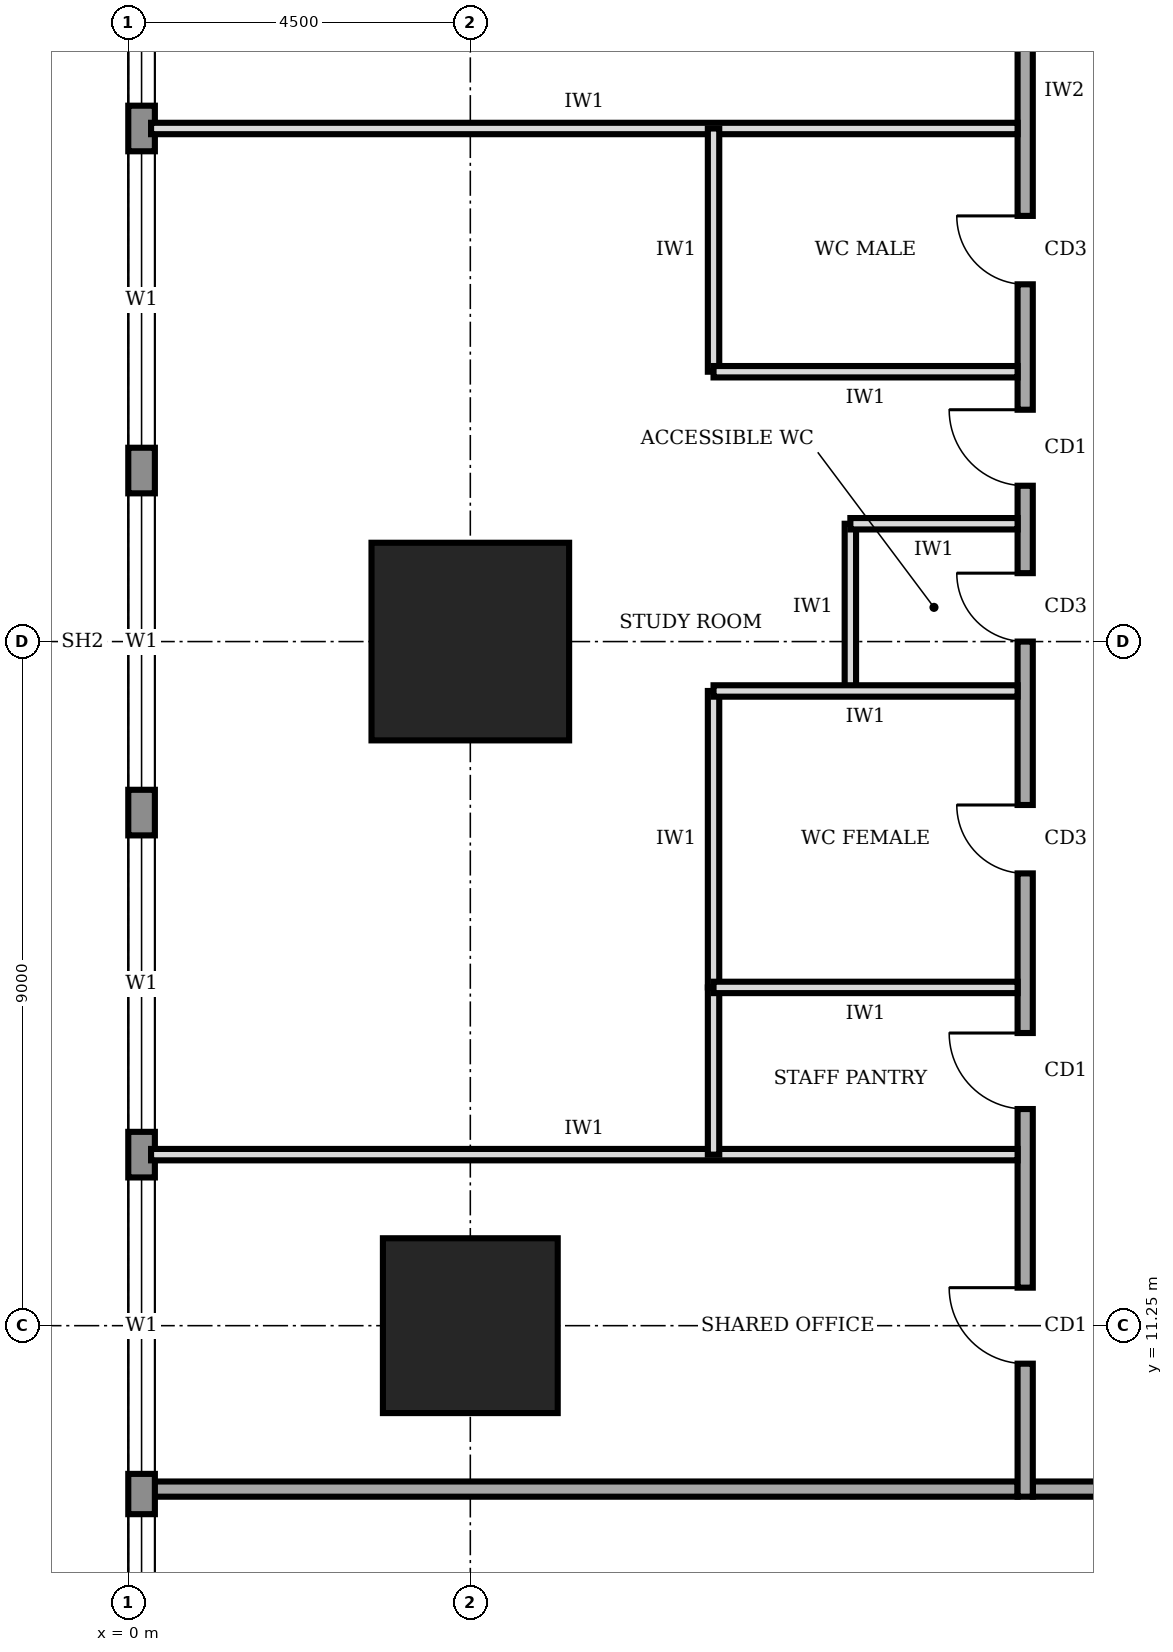
"""IFC4 building model, lengths in metres.
Left out: names, types, materials, properties, quantities, classifications, styles, units other than length and angle.
Written with IfcOpenShell. Run it as: python <this file> out.ifc"""

import sys

from ifc_helpers import new_model, si_unit, direction, frame, frame_2d, origin, origin_2d, place, context, subcontext, project, spatial, rectangle, extrude, element, fill, save


model = new_model("IFC4")
c1 = context("Model", 3, precision=1e-05, world=origin(), true_north=direction((0.0, 1.0)))
c2 = subcontext(c1, "Body", "Model", "MODEL_VIEW")
j1 = project(units=[si_unit("LENGTHUNIT", "METRE"), si_unit("PLANEANGLEUNIT", "RADIAN")], contexts=[c1])
p1 = place(None, origin())
s1 = spatial("IfcSite", under=j1, at=p1, CompositionType="ELEMENT")
p2 = place(p1, origin())
s2 = spatial("IfcBuilding", under=s1, at=p2, CompositionType="ELEMENT")
p3 = place(p2, frame((0.0, 0.0, 125.0)))
s3 = spatial("IfcBuildingStorey", under=s2, at=p3, CompositionType="ELEMENT", Elevation=125.0)
p4 = place(p3, frame((4.5, 11.25, 0.0), z_axis=(0.0, 0.0, 1.0), x_axis=(1.0, 0.0, 0.0)))
e1 = element("IfcColumn", 1, at=p4, inside=s3, PredefinedType="COLUMN", context=c2, shape_type="SweptSolid", body=[
    extrude(rectangle(XDim=2.3, YDim=2.3, at=origin_2d()), origin(), (0.0, 0.0, 1.0), 4.0),
])
p5 = place(p3, frame((4.5, 20.25, 0.0), z_axis=(0.0, 0.0, 1.0), x_axis=(1.0, 0.0, 0.0)))
e2 = element("IfcColumn", 2, at=p5, inside=s3, PredefinedType="COLUMN", context=c2, shape_type="SweptSolid", body=[
    extrude(rectangle(XDim=2.6, YDim=2.6, at=origin_2d()), origin(), (0.0, 0.0, 1.0), 4.0),
])
p6 = place(p3, frame((0.175, 35.98, 0.0), z_axis=(0.0, 0.0, 1.0), x_axis=(0.0, -1.0, 0.0)))
e3 = element("IfcWall", 3, at=p6, inside=s3, PredefinedType="STANDARD", context=c2, shape_type="SweptSolid", body=[
    extrude(rectangle(XDim=31.46, YDim=0.35, at=frame_2d((15.73, 0.0))), origin(), (0.0, 0.0, 1.0), 3.75),
])
p7 = place(p6, frame((27.21, 0.0, 0.9)))
e4 = element("IfcOpeningElement", 4, at=p7, cuts=e3, PredefinedType="OPENING", context=c2, shape_type="SweptSolid", body=[
    extrude(rectangle(XDim=3.9, YDim=2.2, at=frame_2d((1.95, 1.1))), frame((0.0, 0.185, 0.0), z_axis=(0.0, -1.0, 0.0), x_axis=(1.0, 0.0, 0.0)), (0.0, 0.0, 1.0), 0.37),
])
p8 = place(p6, frame((22.78, 0.0, 0.9)))
e5 = element("IfcOpeningElement", 5, at=p8, cuts=e3, PredefinedType="OPENING", context=c2, shape_type="SweptSolid", body=[
    extrude(rectangle(XDim=3.9, YDim=2.2, at=frame_2d((1.95, 1.1))), frame((0.0, 0.185, 0.0), z_axis=(0.0, -1.0, 0.0), x_axis=(1.0, 0.0, 0.0)), (0.0, 0.0, 1.0), 0.37),
])
p9 = place(p6, frame((18.28, 0.0, 0.9)))
e6 = element("IfcOpeningElement", 6, at=p9, cuts=e3, PredefinedType="OPENING", context=c2, shape_type="SweptSolid", body=[
    extrude(rectangle(XDim=3.9, YDim=2.2, at=frame_2d((1.95, 1.1))), frame((0.0, 0.185, 0.0), z_axis=(0.0, -1.0, 0.0), x_axis=(1.0, 0.0, 0.0)), (0.0, 0.0, 1.0), 0.37),
])
p10 = place(p6, frame((13.78, 0.0, 0.9)))
e7 = element("IfcOpeningElement", 7, at=p10, cuts=e3, PredefinedType="OPENING", context=c2, shape_type="SweptSolid", body=[
    extrude(rectangle(XDim=3.9, YDim=2.2, at=frame_2d((1.95, 1.1))), frame((0.0, 0.185, 0.0), z_axis=(0.0, -1.0, 0.0), x_axis=(1.0, 0.0, 0.0)), (0.0, 0.0, 1.0), 0.37),
])
p11 = place(p6, frame((9.28, 0.0, 0.9)))
e8 = element("IfcOpeningElement", 8, at=p11, cuts=e3, PredefinedType="OPENING", context=c2, shape_type="SweptSolid", body=[
    extrude(rectangle(XDim=3.9, YDim=2.2, at=frame_2d((1.95, 1.1))), frame((0.0, 0.185, 0.0), z_axis=(0.0, -1.0, 0.0), x_axis=(1.0, 0.0, 0.0)), (0.0, 0.0, 1.0), 0.37),
])
p12 = place(p6, frame((4.78, 0.0, 0.9)))
e9 = element("IfcOpeningElement", 9, at=p12, cuts=e3, PredefinedType="OPENING", context=c2, shape_type="SweptSolid", body=[
    extrude(rectangle(XDim=3.9, YDim=2.2, at=frame_2d((1.95, 1.1))), frame((0.0, 0.185, 0.0), z_axis=(0.0, -1.0, 0.0), x_axis=(1.0, 0.0, 0.0)), (0.0, 0.0, 1.0), 0.37),
])
p13 = place(p3, frame((11.9, 9.1, 0.0), z_axis=(0.0, 0.0, 1.0), x_axis=(1.0, 0.0, 0.0)))
e10 = element("IfcWall", 10, at=p13, inside=s3, PredefinedType="SOLIDWALL", context=c2, shape_type="SweptSolid", body=[
    extrude(rectangle(XDim=17.65, YDim=0.2, at=frame_2d((8.825, 0.0))), origin(), (0.0, 0.0, 1.0), 3.75),
])
p14 = place(p13, frame((2.25, 0.0, 0.0)))
e11 = element("IfcOpeningElement", 11, at=p14, cuts=e10, PredefinedType="OPENING", context=c2, shape_type="SweptSolid", body=[
    extrude(rectangle(XDim=1.4, YDim=2.1, at=frame_2d((0.7, 1.05))), frame((0.0, 0.11, 0.0), z_axis=(0.0, -1.0, 0.0), x_axis=(1.0, 0.0, 0.0)), (0.0, 0.0, 1.0), 0.22),
])
p15 = place(p13, frame((10.1, 0.0, 0.0)))
e12 = element("IfcOpeningElement", 12, at=p15, cuts=e10, PredefinedType="OPENING", context=c2, shape_type="SweptSolid", body=[
    extrude(rectangle(XDim=1.0, YDim=2.1, at=frame_2d((0.5, 1.05))), frame((0.0, 0.11, 0.0), z_axis=(0.0, -1.0, 0.0), x_axis=(1.0, 0.0, 0.0)), (0.0, 0.0, 1.0), 0.22),
])
p16 = place(p13, frame((15.875, 0.0, 0.0)))
e13 = element("IfcOpeningElement", 13, at=p16, cuts=e10, PredefinedType="OPENING", context=c2, shape_type="SweptSolid", body=[
    extrude(rectangle(XDim=1.0, YDim=2.1, at=frame_2d((0.5, 1.05))), frame((0.0, 0.11, 0.0), z_axis=(0.0, -1.0, 0.0), x_axis=(1.0, 0.0, 0.0)), (0.0, 0.0, 1.0), 0.22),
])
p17 = place(p3, frame((11.8, 32.05, 0.0), z_axis=(0.0, 0.0, 1.0), x_axis=(0.0, -1.0, 0.0)))
e14 = element("IfcWall", 14, at=p17, inside=s3, PredefinedType="SOLIDWALL", context=c2, shape_type="SweptSolid", body=[
    extrude(rectangle(XDim=23.05, YDim=0.2, at=frame_2d((11.525, 0.0))), origin(), (0.0, 0.0, 1.0), 3.75),
])
p18 = place(p17, frame((20.3, 0.0, 0.0)))
e15 = element("IfcOpeningElement", 15, at=p18, cuts=e14, PredefinedType="OPENING", context=c2, shape_type="SweptSolid", body=[
    extrude(rectangle(XDim=1.0, YDim=2.1, at=frame_2d((0.5, 1.05))), frame((0.0, 0.11, 0.0), z_axis=(0.0, -1.0, 0.0), x_axis=(1.0, 0.0, 0.0)), (0.0, 0.0, 1.0), 0.22),
])
p19 = place(p17, frame((16.95, 0.0, 0.0)))
e16 = element("IfcOpeningElement", 16, at=p19, cuts=e14, PredefinedType="OPENING", context=c2, shape_type="SweptSolid", body=[
    extrude(rectangle(XDim=1.0, YDim=2.1, at=frame_2d((0.5, 1.05))), frame((0.0, 0.11, 0.0), z_axis=(0.0, -1.0, 0.0), x_axis=(1.0, 0.0, 0.0)), (0.0, 0.0, 1.0), 0.22),
])
p20 = place(p17, frame((13.95, 0.0, 0.0)))
e17 = element("IfcOpeningElement", 17, at=p20, cuts=e14, PredefinedType="OPENING", context=c2, shape_type="SweptSolid", body=[
    extrude(rectangle(XDim=0.9, YDim=2.1, at=frame_2d((0.45, 1.05))), frame((0.0, 0.11, 0.0), z_axis=(0.0, -1.0, 0.0), x_axis=(1.0, 0.0, 0.0)), (0.0, 0.0, 1.0), 0.22),
])
p21 = place(p17, frame((10.9, 0.0, 0.0)))
e18 = element("IfcOpeningElement", 18, at=p21, cuts=e14, PredefinedType="OPENING", context=c2, shape_type="SweptSolid", body=[
    extrude(rectangle(XDim=0.9, YDim=2.1, at=frame_2d((0.45, 1.05))), frame((0.0, 0.11, 0.0), z_axis=(0.0, -1.0, 0.0), x_axis=(1.0, 0.0, 0.0)), (0.0, 0.0, 1.0), 0.22),
])
p22 = place(p17, frame((6.2, 0.0, 0.0)))
e19 = element("IfcOpeningElement", 19, at=p22, cuts=e14, PredefinedType="OPENING", context=c2, shape_type="SweptSolid", body=[
    extrude(rectangle(XDim=0.9, YDim=2.1, at=frame_2d((0.45, 1.05))), frame((0.0, 0.11, 0.0), z_axis=(0.0, -1.0, 0.0), x_axis=(1.0, 0.0, 0.0)), (0.0, 0.0, 1.0), 0.22),
])
p23 = place(p17, frame((8.75, 0.0, 0.0)))
e20 = element("IfcOpeningElement", 20, at=p23, cuts=e14, PredefinedType="OPENING", context=c2, shape_type="SweptSolid", body=[
    extrude(rectangle(XDim=1.0, YDim=2.1, at=frame_2d((0.5, 1.05))), frame((0.0, 0.11, 0.0), z_axis=(0.0, -1.0, 0.0), x_axis=(1.0, 0.0, 0.0)), (0.0, 0.0, 1.0), 0.22),
])
p24 = place(p17, frame((1.925, 0.0, 0.0)))
e21 = element("IfcOpeningElement", 21, at=p24, cuts=e14, PredefinedType="OPENING", context=c2, shape_type="SweptSolid", body=[
    extrude(rectangle(XDim=1.0, YDim=2.1, at=frame_2d((0.5, 1.05))), frame((0.0, 0.11, 0.0), z_axis=(0.0, -1.0, 0.0), x_axis=(1.0, 0.0, 0.0)), (0.0, 0.0, 1.0), 0.22),
])
p25 = place(p3, frame((0.3, 9.1, 0.0), z_axis=(0.0, 0.0, 1.0), x_axis=(1.0, 0.0, 0.0)))
e22 = element("IfcWall", 22, at=p25, inside=s3, PredefinedType="SOLIDWALL", context=c2, shape_type="SweptSolid", body=[
    extrude(rectangle(XDim=11.4, YDim=0.2, at=frame_2d((5.7, 0.0))), origin(), (0.0, 0.0, 1.0), 3.75),
])
for number, where, z_axis, x_axis in (
    (23, (0.3, 13.5, 0.0), (0.0, 0.0, 1.0), (1.0, 0.0, 0.0)),
    (24, (0.3, 27.0, 0.0), (0.0, 0.0, 1.0), (1.0, 0.0, 0.0)),
):
    element("IfcWall", number, at=place(p3, frame(where, z_axis=z_axis, x_axis=x_axis)), inside=s3, PredefinedType="PARTITIONING", context=c2, shape_type="SweptSolid", body=[
        extrude(rectangle(XDim=11.4, YDim=0.15, at=frame_2d((5.7, 0.0))), origin(), (0.0, 0.0, 1.0), 3.75),
    ])
p26 = place(p3, frame((11.7, 15.7, 0.0), z_axis=(0.0, 0.0, 1.0), x_axis=(-1.0, 0.0, 0.0)))
e25 = element("IfcWall", 25, at=p26, inside=s3, PredefinedType="PARTITIONING", context=c2, shape_type="SweptSolid", body=[
    extrude(rectangle(XDim=4.0, YDim=0.15, at=frame_2d((2.0, 0.0))), origin(), (0.0, 0.0, 1.0), 3.75),
])
p27 = place(p3, frame((11.7, 19.6, 0.0), z_axis=(0.0, 0.0, 1.0), x_axis=(-1.0, 0.0, 0.0)))
e26 = element("IfcWall", 26, at=p27, inside=s3, PredefinedType="PARTITIONING", context=c2, shape_type="SweptSolid", body=[
    extrude(rectangle(XDim=4.0, YDim=0.15, at=frame_2d((2.0, 0.0))), origin(), (0.0, 0.0, 1.0), 2.85),
])
p28 = place(p3, frame((11.7, 21.8, 0.0), z_axis=(0.0, 0.0, 1.0), x_axis=(-1.0, 0.0, 0.0)))
e27 = element("IfcWall", 27, at=p28, inside=s3, PredefinedType="PARTITIONING", context=c2, shape_type="SweptSolid", body=[
    extrude(rectangle(XDim=2.2, YDim=0.15, at=frame_2d((1.1, 0.0))), origin(), (0.0, 0.0, 1.0), 3.75),
])
p29 = place(p3, frame((11.7, 23.8, 0.0), z_axis=(0.0, 0.0, 1.0), x_axis=(-1.0, 0.0, 0.0)))
e28 = element("IfcWall", 28, at=p29, inside=s3, PredefinedType="PARTITIONING", context=c2, shape_type="SweptSolid", body=[
    extrude(rectangle(XDim=4.0, YDim=0.15, at=frame_2d((2.0, 0.0))), origin(), (0.0, 0.0, 1.0), 3.75),
])
p30 = place(p3, frame((7.7, 13.5, 0.0), z_axis=(0.0, 0.0, 1.0), x_axis=(0.0, 1.0, 0.0)))
e29 = element("IfcWall", 29, at=p30, inside=s3, PredefinedType="PARTITIONING", context=c2, shape_type="SweptSolid", body=[
    extrude(rectangle(XDim=2.2, YDim=0.15, at=frame_2d((1.1, 0.0))), origin(), (0.0, 0.0, 1.0), 3.75),
])
p31 = place(p3, frame((7.7, 15.7, 0.0), z_axis=(0.0, 0.0, 1.0), x_axis=(0.0, 1.0, 0.0)))
e30 = element("IfcWall", 30, at=p31, inside=s3, PredefinedType="PARTITIONING", context=c2, shape_type="SweptSolid", body=[
    extrude(rectangle(XDim=3.9, YDim=0.15, at=frame_2d((1.95, 0.0))), origin(), (0.0, 0.0, 1.0), 3.75),
])
p32 = place(p3, frame((9.5, 19.6, 0.0), z_axis=(0.0, 0.0, 1.0), x_axis=(0.0, 1.0, 0.0)))
e31 = element("IfcWall", 31, at=p32, inside=s3, PredefinedType="PARTITIONING", context=c2, shape_type="SweptSolid", body=[
    extrude(rectangle(XDim=2.2, YDim=0.15, at=frame_2d((1.1, 0.0))), origin(), (0.0, 0.0, 1.0), 3.75),
])
p33 = place(p3, frame((7.7, 23.8, 0.0), z_axis=(0.0, 0.0, 1.0), x_axis=(0.0, 1.0, 0.0)))
e32 = element("IfcWall", 32, at=p33, inside=s3, PredefinedType="PARTITIONING", context=c2, shape_type="SweptSolid", body=[
    extrude(rectangle(XDim=3.2, YDim=0.15, at=frame_2d((1.6, 0.0))), origin(), (0.0, 0.0, 1.0), 3.75),
])
p34 = place(p7, origin())
e33 = element("IfcWindow", 33, at=p34, inside=s3, PartitioningType="SINGLE_PANEL", PredefinedType="WINDOW", context=c2, shape_type="SweptSolid", body=[
    extrude(rectangle(XDim=3.9, YDim=2.2, at=frame_2d((1.95, 1.1))), frame((0.0, 0.03, 0.0), z_axis=(0.0, -1.0, 0.0), x_axis=(1.0, 0.0, 0.0)), (0.0, 0.0, 1.0), 0.06),
])
fill(e4, e33)
p35 = place(p8, origin())
e34 = element("IfcWindow", 34, at=p35, inside=s3, PartitioningType="SINGLE_PANEL", PredefinedType="WINDOW", context=c2, shape_type="SweptSolid", body=[
    extrude(rectangle(XDim=3.9, YDim=2.2, at=frame_2d((1.95, 1.1))), frame((0.0, 0.03, 0.0), z_axis=(0.0, -1.0, 0.0), x_axis=(1.0, 0.0, 0.0)), (0.0, 0.0, 1.0), 0.06),
])
fill(e5, e34)
p36 = place(p9, origin())
e35 = element("IfcWindow", 35, at=p36, inside=s3, PartitioningType="SINGLE_PANEL", PredefinedType="WINDOW", context=c2, shape_type="SweptSolid", body=[
    extrude(rectangle(XDim=3.9, YDim=2.2, at=frame_2d((1.95, 1.1))), frame((0.0, 0.03, 0.0), z_axis=(0.0, -1.0, 0.0), x_axis=(1.0, 0.0, 0.0)), (0.0, 0.0, 1.0), 0.06),
])
fill(e6, e35)
p37 = place(p10, origin())
e36 = element("IfcWindow", 36, at=p37, inside=s3, PartitioningType="SINGLE_PANEL", PredefinedType="WINDOW", context=c2, shape_type="SweptSolid", body=[
    extrude(rectangle(XDim=3.9, YDim=2.2, at=frame_2d((1.95, 1.1))), frame((0.0, 0.03, 0.0), z_axis=(0.0, -1.0, 0.0), x_axis=(1.0, 0.0, 0.0)), (0.0, 0.0, 1.0), 0.06),
])
fill(e7, e36)
p38 = place(p11, origin())
e37 = element("IfcWindow", 37, at=p38, inside=s3, PartitioningType="SINGLE_PANEL", PredefinedType="WINDOW", context=c2, shape_type="SweptSolid", body=[
    extrude(rectangle(XDim=3.9, YDim=2.2, at=frame_2d((1.95, 1.1))), frame((0.0, 0.03, 0.0), z_axis=(0.0, -1.0, 0.0), x_axis=(1.0, 0.0, 0.0)), (0.0, 0.0, 1.0), 0.06),
])
fill(e8, e37)
p39 = place(p12, origin())
e38 = element("IfcWindow", 38, at=p39, inside=s3, PartitioningType="SINGLE_PANEL", PredefinedType="WINDOW", context=c2, shape_type="SweptSolid", body=[
    extrude(rectangle(XDim=3.9, YDim=2.2, at=frame_2d((1.95, 1.1))), frame((0.0, 0.03, 0.0), z_axis=(0.0, -1.0, 0.0), x_axis=(1.0, 0.0, 0.0)), (0.0, 0.0, 1.0), 0.06),
])
fill(e9, e38)
p40 = place(p18, frame((1.0, 0.0, 0.0), z_axis=(0.0, 0.0, 1.0), x_axis=(-1.0, 0.0, 0.0)))
e39 = element("IfcDoor", 39, at=p40, inside=s3, OperationType="SINGLE_SWING_RIGHT", PredefinedType="DOOR", context=c2, shape_type="SweptSolid", body=[
    extrude(rectangle(XDim=1.0, YDim=2.1, at=frame_2d((0.5, 1.05))), frame((0.0, 0.025, 0.0), z_axis=(0.0, -1.0, 0.0), x_axis=(1.0, 0.0, 0.0)), (0.0, 0.0, 1.0), 0.05),
])
fill(e15, e39)
p41 = place(p19, frame((1.0, 0.0, 0.0), z_axis=(0.0, 0.0, 1.0), x_axis=(-1.0, 0.0, 0.0)))
e40 = element("IfcDoor", 40, at=p41, inside=s3, OperationType="SINGLE_SWING_RIGHT", PredefinedType="DOOR", context=c2, shape_type="SweptSolid", body=[
    extrude(rectangle(XDim=1.0, YDim=2.1, at=frame_2d((0.5, 1.05))), frame((0.0, 0.025, 0.0), z_axis=(0.0, -1.0, 0.0), x_axis=(1.0, 0.0, 0.0)), (0.0, 0.0, 1.0), 0.05),
])
fill(e16, e40)
p42 = place(p20, frame((0.9, 0.0, 0.0), z_axis=(0.0, 0.0, 1.0), x_axis=(-1.0, 0.0, 0.0)))
e41 = element("IfcDoor", 41, at=p42, inside=s3, OperationType="SINGLE_SWING_RIGHT", PredefinedType="DOOR", context=c2, shape_type="SweptSolid", body=[
    extrude(rectangle(XDim=0.9, YDim=2.1, at=frame_2d((0.45, 1.05))), frame((0.0, 0.025, 0.0), z_axis=(0.0, -1.0, 0.0), x_axis=(1.0, 0.0, 0.0)), (0.0, 0.0, 1.0), 0.05),
])
fill(e17, e41)
p43 = place(p21, frame((0.9, 0.0, 0.0), z_axis=(0.0, 0.0, 1.0), x_axis=(-1.0, 0.0, 0.0)))
e42 = element("IfcDoor", 42, at=p43, inside=s3, OperationType="SINGLE_SWING_RIGHT", PredefinedType="DOOR", context=c2, shape_type="SweptSolid", body=[
    extrude(rectangle(XDim=0.9, YDim=2.1, at=frame_2d((0.45, 1.05))), frame((0.0, 0.025, 0.0), z_axis=(0.0, -1.0, 0.0), x_axis=(1.0, 0.0, 0.0)), (0.0, 0.0, 1.0), 0.05),
])
fill(e18, e42)
p44 = place(p22, frame((0.9, 0.0, 0.0), z_axis=(0.0, 0.0, 1.0), x_axis=(-1.0, 0.0, 0.0)))
e43 = element("IfcDoor", 43, at=p44, inside=s3, OperationType="SINGLE_SWING_RIGHT", PredefinedType="DOOR", context=c2, shape_type="SweptSolid", body=[
    extrude(rectangle(XDim=0.9, YDim=2.1, at=frame_2d((0.45, 1.05))), frame((0.0, 0.025, 0.0), z_axis=(0.0, -1.0, 0.0), x_axis=(1.0, 0.0, 0.0)), (0.0, 0.0, 1.0), 0.05),
])
fill(e19, e43)
p45 = place(p23, frame((1.0, 0.0, 0.0), z_axis=(0.0, 0.0, 1.0), x_axis=(-1.0, 0.0, 0.0)))
e44 = element("IfcDoor", 44, at=p45, inside=s3, OperationType="SINGLE_SWING_RIGHT", PredefinedType="DOOR", context=c2, shape_type="SweptSolid", body=[
    extrude(rectangle(XDim=1.0, YDim=2.1, at=frame_2d((0.5, 1.05))), frame((0.0, 0.025, 0.0), z_axis=(0.0, -1.0, 0.0), x_axis=(1.0, 0.0, 0.0)), (0.0, 0.0, 1.0), 0.05),
])
fill(e20, e44)
save(model, sys.argv[1])
